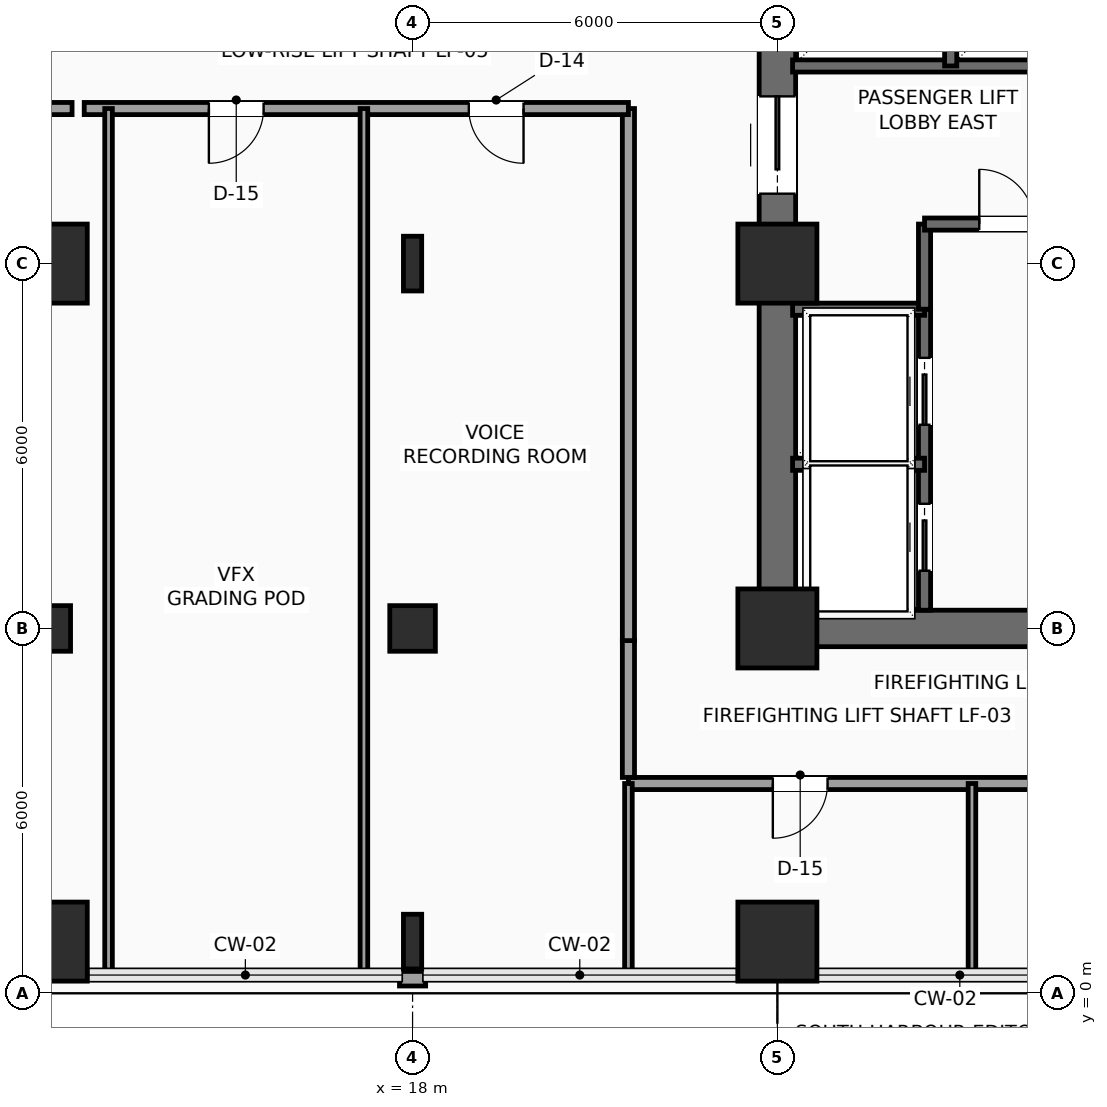
"""IFC4 building model, lengths in metres.
Left out: names, types, materials, properties, quantities, classifications, styles, units other than length and angle.
Written with IfcOpenShell. Run it as: python <this file> out.ifc"""

import sys

from ifc_helpers import new_model, si_unit, direction, frame, frame_2d, origin, origin_2d, place, context, subcontext, project, spatial, rectangle, hollow_rectangle, i_section, extrude, element, fill, save


model = new_model("IFC4")
c1 = context("Model", 3, precision=1e-05, world=origin(), true_north=direction((0.0, 1.0)))
c2 = subcontext(c1, "Body", "Model", "MODEL_VIEW")
j1 = project(units=[si_unit("LENGTHUNIT", "METRE"), si_unit("PLANEANGLEUNIT", "RADIAN")], contexts=[c1])
p1 = place(None, origin())
s1 = spatial("IfcSite", under=j1, at=p1, CompositionType="ELEMENT")
p2 = place(p1, origin())
s2 = spatial("IfcBuilding", under=s1, at=p2, CompositionType="ELEMENT")
p3 = place(p2, frame((0.0, 0.0, 44.1)))
s3 = spatial("IfcBuildingStorey", under=s2, at=p3, CompositionType="ELEMENT", Elevation=44.1)
for number, where, z_axis, x_axis in (
    (1, (24.0, 6.0, 0.0), (0.0, 0.0, 1.0), (1.0, 0.0, 0.0)),
    (2, (24.0, 12.0, 0.0), (0.0, 0.0, 1.0), (1.0, 0.0, 0.0)),
    (3, (12.0, 0.85, 0.0), (0.0, 0.0, 1.0), (1.0, 0.0, 0.0)),
):
    element("IfcColumn", number, at=place(p3, frame(where, z_axis=z_axis, x_axis=x_axis)), inside=s3, PredefinedType="COLUMN", context=c2, shape_type="SweptSolid", body=[
        extrude(rectangle(XDim=1.3, YDim=1.3, at=origin_2d()), origin(), (0.0, 0.0, 1.0), 3.9),
    ])
p4 = place(p3, frame((12.0, 6.0, 0.0), z_axis=(0.0, 0.0, 1.0), x_axis=(1.0, 0.0, 0.0)))
e4 = element("IfcColumn", 4, at=p4, inside=s3, PredefinedType="COLUMN", context=c2, shape_type="SweptSolid", body=[
    extrude(hollow_rectangle(XDim=0.75, YDim=0.75, WallThickness=0.035, InnerFilletRadius=0.035, OuterFilletRadius=0.05, at=origin_2d()), origin(), (0.0, 0.0, 1.0), 3.9),
])
p5 = place(p3, frame((12.0, 12.0, 0.0), z_axis=(0.0, 0.0, 1.0), x_axis=(1.0, 0.0, 0.0)))
e5 = element("IfcColumn", 5, at=p5, inside=s3, PredefinedType="COLUMN", context=c2, shape_type="SweptSolid", body=[
    extrude(rectangle(XDim=1.3, YDim=1.3, at=origin_2d()), origin(), (0.0, 0.0, 1.0), 3.9),
])
p6 = place(p3, frame((18.0, 0.85, 0.0), z_axis=(0.0, 0.0, 1.0), x_axis=(1.0, 0.0, 0.0)))
e6 = element("IfcColumn", 6, at=p6, inside=s3, PredefinedType="COLUMN", context=c2, shape_type="SweptSolid", body=[
    extrude(i_section(OverallWidth=0.3, OverallDepth=0.9, WebThickness=0.019, FlangeThickness=0.035, FilletRadius=0.03, at=origin_2d()), origin(), (0.0, 0.0, 1.0), 3.9),
])
p7 = place(p3, frame((18.0, 6.0, 0.0), z_axis=(0.0, 0.0, 1.0), x_axis=(1.0, 0.0, 0.0)))
e7 = element("IfcColumn", 7, at=p7, inside=s3, PredefinedType="COLUMN", context=c2, shape_type="SweptSolid", body=[
    extrude(hollow_rectangle(XDim=0.75, YDim=0.75, WallThickness=0.035, InnerFilletRadius=0.035, OuterFilletRadius=0.05, at=origin_2d()), origin(), (0.0, 0.0, 1.0), 3.9),
])
p8 = place(p3, frame((18.0, 12.0, 0.0), z_axis=(0.0, 0.0, 1.0), x_axis=(1.0, 0.0, 0.0)))
e8 = element("IfcColumn", 8, at=p8, inside=s3, PredefinedType="COLUMN", context=c2, shape_type="SweptSolid", body=[
    extrude(i_section(OverallWidth=0.3, OverallDepth=0.9, WebThickness=0.019, FlangeThickness=0.035, FilletRadius=0.03, at=origin_2d()), origin(), (0.0, 0.0, 1.0), 3.9),
])
p9 = place(p3, frame((24.0, 0.85, 0.0), z_axis=(0.0, 0.0, 1.0), x_axis=(1.0, 0.0, 0.0)))
e9 = element("IfcColumn", 9, at=p9, inside=s3, PredefinedType="COLUMN", context=c2, shape_type="SweptSolid", body=[
    extrude(rectangle(XDim=1.3, YDim=1.3, at=origin_2d()), origin(), (0.0, 0.0, 1.0), 3.9),
])
p10 = place(p3, frame((18.215, 0.24, 0.0), z_axis=(0.0, 0.0, 1.0), x_axis=(-1.0, 0.0, 0.0)))
e10 = element("IfcWall", 10, at=p10, inside=s3, PredefinedType="SOLIDWALL", context=c2, shape_type="SweptSolid", body=[
    extrude(rectangle(XDim=0.43, YDim=0.24, at=frame_2d((0.215, 0.0))), origin(), (0.0, 0.0, 1.0), 3.65),
])
p11 = place(p3, frame((24.0, 6.0, 0.0), z_axis=(0.0, 0.0, 1.0), x_axis=(1.0, 0.0, 0.0)))
e11 = element("IfcWall", 11, at=p11, inside=s3, PredefinedType="SHEAR", context=c2, shape_type="SweptSolid", body=[
    extrude(rectangle(XDim=9.6, YDim=0.6, at=frame_2d((4.8, 0.0))), origin(), (0.0, 0.0, 1.0), 3.65),
])
p12 = place(p3, frame((24.0, 6.0, 0.0), z_axis=(0.0, 0.0, 1.0), x_axis=(0.0, 1.0, 0.0)))
e12 = element("IfcWall", 12, at=p12, inside=s3, PredefinedType="SHEAR", context=c2, shape_type="SweptSolid", body=[
    extrude(rectangle(XDim=12.0, YDim=0.6, at=frame_2d((6.0, 0.0))), origin(), (0.0, 0.0, 1.0), 3.65),
])
p13 = place(p12, frame((7.15, 0.0, 0.0)))
e13 = element("IfcOpeningElement", 13, at=p13, cuts=e12, PredefinedType="OPENING", context=c2, shape_type="SweptSolid", body=[
    extrude(rectangle(XDim=1.6, YDim=2.3, at=frame_2d((0.8, 1.15))), frame((0.0, 0.31, 0.0), z_axis=(0.0, -1.0, 0.0), x_axis=(1.0, 0.0, 0.0)), (0.0, 0.0, 1.0), 0.62),
])
p14 = place(p3, frame((26.42, 6.3, 0.0), z_axis=(0.0, 0.0, 1.0), x_axis=(0.0, 1.0, 0.0)))
e14 = element("IfcWall", 14, at=p14, inside=s3, PredefinedType="SHEAR", context=c2, shape_type="SweptSolid", body=[
    extrude(rectangle(XDim=4.95, YDim=0.2, at=frame_2d((2.475, 0.0))), origin(), (0.0, 0.0, 1.0), 3.65),
])
p15 = place(p14, frame((0.65, 0.0, 0.0)))
e15 = element("IfcOpeningElement", 15, at=p15, cuts=e14, PredefinedType="OPENING", context=c2, shape_type="SweptSolid", body=[
    extrude(rectangle(XDim=1.1, YDim=2.2, at=frame_2d((0.55, 1.1))), frame((0.0, 0.11, 0.0), z_axis=(0.0, -1.0, 0.0), x_axis=(1.0, 0.0, 0.0)), (0.0, 0.0, 1.0), 0.22),
])
p16 = place(p14, frame((3.05, 0.0, 0.0)))
e16 = element("IfcOpeningElement", 16, at=p16, cuts=e14, PredefinedType="OPENING", context=c2, shape_type="SweptSolid", body=[
    extrude(rectangle(XDim=1.1, YDim=2.2, at=frame_2d((0.55, 1.1))), frame((0.0, 0.11, 0.0), z_axis=(0.0, -1.0, 0.0), x_axis=(1.0, 0.0, 0.0)), (0.0, 0.0, 1.0), 0.22),
])
for number, where, z_axis, x_axis in (
    (17, (24.25, 8.7, 0.0), (0.0, 0.0, 1.0), (1.0, 0.0, 0.0)),
    (18, (24.25, 11.25, 0.0), (0.0, 0.0, 1.0), (1.0, 0.0, 0.0)),
):
    element("IfcWall", number, at=place(p3, frame(where, z_axis=z_axis, x_axis=x_axis)), inside=s3, PredefinedType="SHEAR", context=c2, shape_type="SweptSolid", body=[
        extrude(rectangle(XDim=2.17, YDim=0.2, at=frame_2d((1.085, 0.0))), origin(), (0.0, 0.0, 1.0), 3.65),
    ])
p17 = place(p3, frame((26.42, 11.25, 0.0), z_axis=(0.0, 0.0, 1.0), x_axis=(0.0, 1.0, 0.0)))
e19 = element("IfcWall", 19, at=p17, inside=s3, PredefinedType="SHEAR", context=c2, shape_type="SweptSolid", body=[
    extrude(rectangle(XDim=1.4, YDim=0.2, at=frame_2d((0.7, 0.0))), origin(), (0.0, 0.0, 1.0), 3.65),
])
p18 = place(p3, frame((26.42, 12.65, 0.0), z_axis=(0.0, 0.0, 1.0), x_axis=(1.0, 0.0, 0.0)))
e20 = element("IfcWall", 20, at=p18, inside=s3, PredefinedType="SHEAR", context=c2, shape_type="SweptSolid", body=[
    extrude(rectangle(XDim=2.84, YDim=0.2, at=frame_2d((1.42, 0.0))), origin(), (0.0, 0.0, 1.0), 3.65),
])
p19 = place(p18, frame((0.9, 0.0, 0.0)))
e21 = element("IfcOpeningElement", 21, at=p19, cuts=e20, PredefinedType="OPENING", context=c2, shape_type="SweptSolid", body=[
    extrude(rectangle(XDim=0.9, YDim=2.15, at=frame_2d((0.45, 1.075))), frame((0.0, 0.11, 0.0), z_axis=(0.0, -1.0, 0.0), x_axis=(1.0, 0.0, 0.0)), (0.0, 0.0, 1.0), 0.22),
])
p20 = place(p3, frame((24.25, 15.25, 0.0), z_axis=(0.0, 0.0, 1.0), x_axis=(1.0, 0.0, 0.0)))
e22 = element("IfcWall", 22, at=p20, inside=s3, PredefinedType="SHEAR", context=c2, shape_type="SweptSolid", body=[
    extrude(rectangle(XDim=5.2, YDim=0.2, at=frame_2d((2.6, 0.0))), origin(), (0.0, 0.0, 1.0), 3.65),
])
p21 = place(p3, frame((26.85, 15.25, 0.0), z_axis=(0.0, 0.0, 1.0), x_axis=(0.0, 1.0, 0.0)))
e23 = element("IfcWall", 23, at=p21, inside=s3, PredefinedType="SHEAR", context=c2, shape_type="SweptSolid", body=[
    extrude(rectangle(XDim=2.4, YDim=0.2, at=frame_2d((1.2, 0.0))), origin(), (0.0, 0.0, 1.0), 3.65),
])
p22 = place(p3, frame((36.15, 3.45, 0.0), z_axis=(0.0, 0.0, 1.0), x_axis=(-1.0, 0.0, 0.0)))
e24 = element("IfcWall", 24, at=p22, inside=s3, PredefinedType="PARTITIONING", context=c2, shape_type="SweptSolid", body=[
    extrude(rectangle(XDim=14.6, YDim=0.2, at=frame_2d((7.3, 0.0))), origin(), (0.0, 0.0, 1.0), 3.142),
])
p23 = place(p22, frame((11.325, 0.0, 0.0)))
e25 = element("IfcOpeningElement", 25, at=p23, cuts=e24, PredefinedType="OPENING", context=c2, shape_type="SweptSolid", body=[
    extrude(rectangle(XDim=0.9, YDim=2.1, at=frame_2d((0.45, 1.05))), frame((0.0, 0.11, 0.0), z_axis=(0.0, -1.0, 0.0), x_axis=(1.0, 0.0, 0.0)), (0.0, 0.0, 1.0), 0.22),
])
p24 = place(p22, frame((5.7, 0.0, 0.0)))
e26 = element("IfcOpeningElement", 26, at=p24, cuts=e24, PredefinedType="OPENING", context=c2, shape_type="SweptSolid", body=[
    extrude(rectangle(XDim=0.9, YDim=2.1, at=frame_2d((0.45, 1.05))), frame((0.0, 0.11, 0.0), z_axis=(0.0, -1.0, 0.0), x_axis=(1.0, 0.0, 0.0)), (0.0, 0.0, 1.0), 0.22),
])
p25 = place(p3, frame((21.55, 3.55, 0.0), z_axis=(0.0, 0.0, 1.0), x_axis=(0.0, 1.0, 0.0)))
e27 = element("IfcWall", 27, at=p25, inside=s3, PredefinedType="PARTITIONING", context=c2, shape_type="SweptSolid", body=[
    extrude(rectangle(XDim=2.25, YDim=0.2, at=frame_2d((1.125, 0.0))), origin(), (0.0, 0.0, 1.0), 3.65),
])
p26 = place(p3, frame((21.55, 5.8, 0.0), z_axis=(0.0, 0.0, 1.0), x_axis=(0.0, 1.0, 0.0)))
e28 = element("IfcWall", 28, at=p26, inside=s3, PredefinedType="PARTITIONING", context=c2, shape_type="SweptSolid", body=[
    extrude(rectangle(XDim=8.75, YDim=0.2, at=frame_2d((4.375, 0.0))), origin(), (0.0, 0.0, 1.0), 3.65),
])
p27 = place(p3, frame((21.55, 14.55, 0.0), z_axis=(0.0, 0.0, 1.0), x_axis=(-1.0, 0.0, 0.0)))
e29 = element("IfcWall", 29, at=p27, inside=s3, PredefinedType="PARTITIONING", context=c2, shape_type="SweptSolid", body=[
    extrude(rectangle(XDim=8.95, YDim=0.2, at=frame_2d((4.475, 0.0))), origin(), (0.0, 0.0, 1.0), 3.65),
])
p28 = place(p27, frame((6.0, 0.0, 0.0)))
e30 = element("IfcOpeningElement", 30, at=p28, cuts=e29, PredefinedType="OPENING", context=c2, shape_type="SweptSolid", body=[
    extrude(rectangle(XDim=0.9, YDim=2.1, at=frame_2d((0.45, 1.05))), frame((0.0, 0.11, 0.0), z_axis=(0.0, -1.0, 0.0), x_axis=(1.0, 0.0, 0.0)), (0.0, 0.0, 1.0), 0.22),
])
p29 = place(p27, frame((1.725, 0.0, 0.0)))
e31 = element("IfcOpeningElement", 31, at=p29, cuts=e29, PredefinedType="OPENING", context=c2, shape_type="SweptSolid", body=[
    extrude(rectangle(XDim=0.9, YDim=2.1, at=frame_2d((0.45, 1.05))), frame((0.0, 0.11, 0.0), z_axis=(0.0, -1.0, 0.0), x_axis=(1.0, 0.0, 0.0)), (0.0, 0.0, 1.0), 0.22),
])
p30 = place(p3, frame((12.4, 14.55, 0.0), z_axis=(0.0, 0.0, 1.0), x_axis=(-1.0, 0.0, 0.0)))
e32 = element("IfcWall", 32, at=p30, inside=s3, PredefinedType="PARTITIONING", context=c2, shape_type="SweptSolid", body=[
    extrude(rectangle(XDim=7.15, YDim=0.2, at=frame_2d((3.575, 0.0))), origin(), (0.0, 0.0, 1.0), 3.65),
])
p31 = place(p30, frame((4.925, 0.0, 0.0)))
e33 = element("IfcOpeningElement", 33, at=p31, cuts=e32, PredefinedType="OPENING", context=c2, shape_type="SweptSolid", body=[
    extrude(rectangle(XDim=0.9, YDim=2.1, at=frame_2d((0.45, 1.05))), frame((0.0, 0.11, 0.0), z_axis=(0.0, -1.0, 0.0), x_axis=(1.0, 0.0, 0.0)), (0.0, 0.0, 1.0), 0.22),
])
p32 = place(p30, frame((1.35, 0.0, 0.0)))
e34 = element("IfcOpeningElement", 34, at=p32, cuts=e32, PredefinedType="OPENING", context=c2, shape_type="SweptSolid", body=[
    extrude(rectangle(XDim=0.9, YDim=2.1, at=frame_2d((0.45, 1.05))), frame((0.0, 0.11, 0.0), z_axis=(0.0, -1.0, 0.0), x_axis=(1.0, 0.0, 0.0)), (0.0, 0.0, 1.0), 0.22),
])
for number, where, z_axis, x_axis in (
    (35, (13.0, 0.3, 0.0), (0.0, 0.0, 1.0), (0.0, 1.0, 0.0)),
    (36, (17.2, 0.3, 0.0), (0.0, 0.0, 1.0), (0.0, 1.0, 0.0)),
):
    element("IfcWall", number, at=place(p3, frame(where, z_axis=z_axis, x_axis=x_axis)), inside=s3, PredefinedType="PARTITIONING", context=c2, shape_type="SweptSolid", body=[
        extrude(rectangle(XDim=14.25, YDim=0.125, at=frame_2d((7.125, 0.0))), origin(), (0.0, 0.0, 1.0), 3.65),
    ])
for number, where, z_axis, x_axis in (
    (37, (21.55, 0.3, 0.0), (0.0, 0.0, 1.0), (0.0, 1.0, 0.0)),
    (38, (27.2, 0.3, 0.0), (0.0, 0.0, 1.0), (0.0, 1.0, 0.0)),
):
    element("IfcWall", number, at=place(p3, frame(where, z_axis=z_axis, x_axis=x_axis)), inside=s3, PredefinedType="PARTITIONING", context=c2, shape_type="SweptSolid", body=[
        extrude(rectangle(XDim=3.15, YDim=0.125, at=frame_2d((1.575, 0.0))), origin(), (0.0, 0.0, 1.0), 3.65),
    ])
p33 = place(p13, origin())
e39 = element("IfcDoor", 39, at=p33, inside=s3, OperationType="DOUBLE_DOOR_SLIDING", PredefinedType="DOOR", context=c2, shape_type="SweptSolid", body=[
    extrude(rectangle(XDim=1.6, YDim=2.3, at=frame_2d((0.8, 1.15))), frame((0.0, 0.025, 0.0), z_axis=(0.0, -1.0, 0.0), x_axis=(1.0, 0.0, 0.0)), (0.0, 0.0, 1.0), 0.05),
])
fill(e13, e39)
p34 = place(p15, origin())
e40 = element("IfcDoor", 40, at=p34, inside=s3, OperationType="SLIDING_TO_LEFT", PredefinedType="DOOR", context=c2, shape_type="SweptSolid", body=[
    extrude(rectangle(XDim=1.1, YDim=2.2, at=frame_2d((0.55, 1.1))), frame((0.0, 0.025, 0.0), z_axis=(0.0, -1.0, 0.0), x_axis=(1.0, 0.0, 0.0)), (0.0, 0.0, 1.0), 0.05),
])
fill(e15, e40)
p35 = place(p16, origin())
e41 = element("IfcDoor", 41, at=p35, inside=s3, OperationType="SLIDING_TO_LEFT", PredefinedType="DOOR", context=c2, shape_type="SweptSolid", body=[
    extrude(rectangle(XDim=1.1, YDim=2.2, at=frame_2d((0.55, 1.1))), frame((0.0, 0.025, 0.0), z_axis=(0.0, -1.0, 0.0), x_axis=(1.0, 0.0, 0.0)), (0.0, 0.0, 1.0), 0.05),
])
fill(e16, e41)
p36 = place(p19, origin())
e42 = element("IfcDoor", 42, at=p36, inside=s3, OperationType="SINGLE_SWING_LEFT", PredefinedType="DOOR", context=c2, shape_type="SweptSolid", body=[
    extrude(rectangle(XDim=0.9, YDim=2.15, at=frame_2d((0.45, 1.075))), frame((0.0, 0.025, 0.0), z_axis=(0.0, -1.0, 0.0), x_axis=(1.0, 0.0, 0.0)), (0.0, 0.0, 1.0), 0.05),
])
fill(e21, e42)
p37 = place(p23, origin())
e43 = element("IfcDoor", 43, at=p37, inside=s3, OperationType="SINGLE_SWING_RIGHT", PredefinedType="DOOR", context=c2, shape_type="SweptSolid", body=[
    extrude(rectangle(XDim=0.9, YDim=2.1, at=frame_2d((0.45, 1.05))), frame((0.0, 0.025, 0.0), z_axis=(0.0, -1.0, 0.0), x_axis=(1.0, 0.0, 0.0)), (0.0, 0.0, 1.0), 0.05),
])
fill(e25, e43)
p38 = place(p28, origin())
e44 = element("IfcDoor", 44, at=p38, inside=s3, OperationType="SINGLE_SWING_RIGHT", PredefinedType="DOOR", context=c2, shape_type="SweptSolid", body=[
    extrude(rectangle(XDim=0.9, YDim=2.1, at=frame_2d((0.45, 1.05))), frame((0.0, 0.025, 0.0), z_axis=(0.0, -1.0, 0.0), x_axis=(1.0, 0.0, 0.0)), (0.0, 0.0, 1.0), 0.05),
])
fill(e30, e44)
p39 = place(p29, origin())
e45 = element("IfcDoor", 45, at=p39, inside=s3, OperationType="SINGLE_SWING_LEFT", PredefinedType="DOOR", context=c2, shape_type="SweptSolid", body=[
    extrude(rectangle(XDim=0.9, YDim=2.1, at=frame_2d((0.45, 1.05))), frame((0.0, 0.025, 0.0), z_axis=(0.0, -1.0, 0.0), x_axis=(1.0, 0.0, 0.0)), (0.0, 0.0, 1.0), 0.05),
])
fill(e31, e45)
save(model, sys.argv[1])
